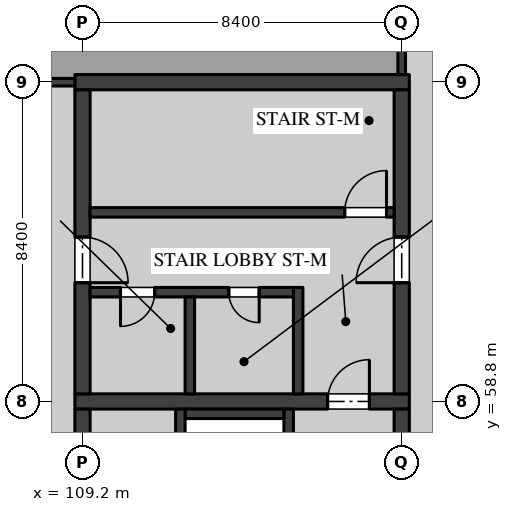
"""IFC4 building model, lengths in metres.
Left out: names, types, materials, properties, quantities, classifications, styles, units other than length and angle.
Written with IfcOpenShell. Run it as: python <this file> out.ifc"""

import sys

from ifc_helpers import new_model, si_unit, direction, frame, frame_2d, origin, place, context, subcontext, project, spatial, rectangle, extrude, element, fill, save


model = new_model("IFC4")
c1 = context("Model", 3, precision=1e-05, world=origin(), true_north=direction((0.0, 1.0)))
c2 = subcontext(c1, "Body", "Model", "MODEL_VIEW")
j1 = project(units=[si_unit("LENGTHUNIT", "METRE"), si_unit("PLANEANGLEUNIT", "RADIAN")], contexts=[c1])
p1 = place(None, origin())
s1 = spatial("IfcSite", under=j1, at=p1, CompositionType="ELEMENT")
p2 = place(p1, origin())
s2 = spatial("IfcBuilding", under=s1, at=p2, CompositionType="ELEMENT")
p3 = place(p2, frame((0.0, 0.0, -4.5)))
s3 = spatial("IfcBuildingStorey", under=s2, at=p3, CompositionType="ELEMENT", Elevation=-4.5)
p4 = place(p3, frame((109.0, 58.8, 0.0), z_axis=(0.0, 0.0, 1.0), x_axis=(1.0, 0.0, 0.0)))
e1 = element("IfcWall", 1, at=p4, inside=s3, PredefinedType="SHEAR", context=c2, shape_type="SweptSolid", body=[
    extrude(rectangle(XDim=8.8, YDim=0.4, at=frame_2d((4.4, 0.0))), origin(), (0.0, 0.0, 1.0), 4.05),
])
p5 = place(p4, frame((6.65, 0.0, 0.0)))
e2 = element("IfcOpeningElement", 2, at=p5, cuts=e1, PredefinedType="OPENING", context=c2, shape_type="SweptSolid", body=[
    extrude(rectangle(XDim=1.1, YDim=2.1, at=frame_2d((0.55, 1.05))), frame((0.0, 0.21, 0.0), z_axis=(0.0, -1.0, 0.0), x_axis=(1.0, 0.0, 0.0)), (0.0, 0.0, 1.0), 0.42),
])
p6 = place(p3, frame((109.2, 50.6, 0.0), z_axis=(0.0, 0.0, 1.0), x_axis=(0.0, 1.0, 0.0)))
e3 = element("IfcWall", 3, at=p6, inside=s3, PredefinedType="SHEAR", context=c2, shape_type="SweptSolid", body=[
    extrude(rectangle(XDim=8.0, YDim=0.4, at=frame_2d((4.0, 0.0))), origin(), (0.0, 0.0, 1.0), 4.05),
])
p7 = place(p6, frame((3.25, 0.0, 0.0)))
e4 = element("IfcOpeningElement", 4, at=p7, cuts=e3, PredefinedType="OPENING", context=c2, shape_type="SweptSolid", body=[
    extrude(rectangle(XDim=1.2, YDim=2.1, at=frame_2d((0.6, 1.05))), frame((0.0, 0.21, 0.0), z_axis=(0.0, -1.0, 0.0), x_axis=(1.0, 0.0, 0.0)), (0.0, 0.0, 1.0), 0.42),
])
p8 = place(p3, frame((117.6, 50.6, 0.0), z_axis=(0.0, 0.0, 1.0), x_axis=(0.0, 1.0, 0.0)))
e5 = element("IfcWall", 5, at=p8, inside=s3, PredefinedType="SHEAR", context=c2, shape_type="SweptSolid", body=[
    extrude(rectangle(XDim=8.0, YDim=0.4, at=frame_2d((4.0, 0.0))), origin(), (0.0, 0.0, 1.0), 4.05),
])
p9 = place(p8, frame((3.25, 0.0, 0.0)))
e6 = element("IfcOpeningElement", 6, at=p9, cuts=e5, PredefinedType="OPENING", context=c2, shape_type="SweptSolid", body=[
    extrude(rectangle(XDim=1.2, YDim=2.1, at=frame_2d((0.6, 1.05))), frame((0.0, 0.21, 0.0), z_axis=(0.0, -1.0, 0.0), x_axis=(1.0, 0.0, 0.0)), (0.0, 0.0, 1.0), 0.42),
])
p10 = place(p8, frame((6.0, 0.0, 0.0)))
e7 = element("IfcOpeningElement", 7, at=p10, cuts=e5, PredefinedType="OPENING", context=c2, shape_type="SweptSolid", body=[
    extrude(rectangle(XDim=1.2, YDim=2.1, at=frame_2d((0.6, 1.05))), frame((0.0, 0.21, 0.0), z_axis=(0.0, -1.0, 0.0), x_axis=(1.0, 0.0, 0.0)), (0.0, 0.0, 1.0), 0.42),
])
p11 = place(p3, frame((109.0, 67.2, 0.0), z_axis=(0.0, 0.0, 1.0), x_axis=(1.0, 0.0, 0.0)))
e8 = element("IfcWall", 8, at=p11, inside=s3, PredefinedType="SHEAR", context=c2, shape_type="SweptSolid", body=[
    extrude(rectangle(XDim=8.8, YDim=0.4, at=frame_2d((4.4, 0.0))), origin(), (0.0, 0.0, 1.0), 4.05),
])
p12 = place(p3, frame((109.2, 59.0, 0.0), z_axis=(0.0, 0.0, 1.0), x_axis=(0.0, 1.0, 0.0)))
e9 = element("IfcWall", 9, at=p12, inside=s3, PredefinedType="SHEAR", context=c2, shape_type="SweptSolid", body=[
    extrude(rectangle(XDim=8.0, YDim=0.4, at=frame_2d((4.0, 0.0))), origin(), (0.0, 0.0, 1.0), 4.05),
])
p13 = place(p12, frame((2.925, 0.0, 0.0)))
e10 = element("IfcOpeningElement", 10, at=p13, cuts=e9, PredefinedType="OPENING", context=c2, shape_type="SweptSolid", body=[
    extrude(rectangle(XDim=1.2, YDim=2.1, at=frame_2d((0.6, 1.05))), frame((0.0, 0.21, 0.0), z_axis=(0.0, -1.0, 0.0), x_axis=(1.0, 0.0, 0.0)), (0.0, 0.0, 1.0), 0.42),
])
p14 = place(p3, frame((117.6, 59.0, 0.0), z_axis=(0.0, 0.0, 1.0), x_axis=(0.0, 1.0, 0.0)))
e11 = element("IfcWall", 11, at=p14, inside=s3, PredefinedType="SHEAR", context=c2, shape_type="SweptSolid", body=[
    extrude(rectangle(XDim=8.0, YDim=0.4, at=frame_2d((4.0, 0.0))), origin(), (0.0, 0.0, 1.0), 4.05),
])
p15 = place(p14, frame((2.925, 0.0, 0.0)))
e12 = element("IfcOpeningElement", 12, at=p15, cuts=e11, PredefinedType="OPENING", context=c2, shape_type="SweptSolid", body=[
    extrude(rectangle(XDim=1.2, YDim=2.1, at=frame_2d((0.6, 1.05))), frame((0.0, 0.21, 0.0), z_axis=(0.0, -1.0, 0.0), x_axis=(1.0, 0.0, 0.0)), (0.0, 0.0, 1.0), 0.42),
])
p16 = place(p3, frame((117.4, 63.775, 0.0), z_axis=(0.0, 0.0, 1.0), x_axis=(-1.0, 0.0, 0.0)))
e13 = element("IfcWall", 13, at=p16, inside=s3, PredefinedType="SOLIDWALL", context=c2, shape_type="SweptSolid", body=[
    extrude(rectangle(XDim=8.0, YDim=0.25, at=frame_2d((4.0, 0.0))), origin(), (0.0, 0.0, 1.0), 4.05),
])
p17 = place(p16, frame((0.2, 0.0, 0.0)))
e14 = element("IfcOpeningElement", 14, at=p17, cuts=e13, PredefinedType="OPENING", context=c2, shape_type="SweptSolid", body=[
    extrude(rectangle(XDim=1.1, YDim=2.1, at=frame_2d((0.55, 1.05))), frame((0.0, 0.135, 0.0), z_axis=(0.0, -1.0, 0.0), x_axis=(1.0, 0.0, 0.0)), (0.0, 0.0, 1.0), 0.27),
])
p18 = place(p3, frame((114.875, 61.8, 0.0), z_axis=(0.0, 0.0, 1.0), x_axis=(0.0, -1.0, 0.0)))
e15 = element("IfcWall", 15, at=p18, inside=s3, PredefinedType="SOLIDWALL", context=c2, shape_type="SweptSolid", body=[
    extrude(rectangle(XDim=2.8, YDim=0.25, at=frame_2d((1.4, 0.0))), origin(), (0.0, 0.0, 1.0), 4.05),
])
p19 = place(p3, frame((114.75, 61.675, 0.0), z_axis=(0.0, 0.0, 1.0), x_axis=(-1.0, 0.0, 0.0)))
e16 = element("IfcWall", 16, at=p19, inside=s3, PredefinedType="SOLIDWALL", context=c2, shape_type="SweptSolid", body=[
    extrude(rectangle(XDim=5.35, YDim=0.25, at=frame_2d((2.675, 0.0))), origin(), (0.0, 0.0, 1.0), 4.05),
])
p20 = place(p19, frame((3.65, 0.0, 0.0)))
e17 = element("IfcOpeningElement", 17, at=p20, cuts=e16, PredefinedType="OPENING", context=c2, shape_type="SweptSolid", body=[
    extrude(rectangle(XDim=0.9, YDim=2.1, at=frame_2d((0.45, 1.05))), frame((0.0, 0.135, 0.0), z_axis=(0.0, -1.0, 0.0), x_axis=(1.0, 0.0, 0.0)), (0.0, 0.0, 1.0), 0.27),
])
p21 = place(p19, frame((0.9, 0.0, 0.0)))
e18 = element("IfcOpeningElement", 18, at=p21, cuts=e16, PredefinedType="OPENING", context=c2, shape_type="SweptSolid", body=[
    extrude(rectangle(XDim=0.8, YDim=2.1, at=frame_2d((0.4, 1.05))), frame((0.0, 0.135, 0.0), z_axis=(0.0, -1.0, 0.0), x_axis=(1.0, 0.0, 0.0)), (0.0, 0.0, 1.0), 0.27),
])
p22 = place(p3, frame((112.025, 61.55, 0.0), z_axis=(0.0, 0.0, 1.0), x_axis=(0.0, -1.0, 0.0)))
e19 = element("IfcWall", 19, at=p22, inside=s3, PredefinedType="SOLIDWALL", context=c2, shape_type="SweptSolid", body=[
    extrude(rectangle(XDim=2.55, YDim=0.25, at=frame_2d((1.275, 0.0))), origin(), (0.0, 0.0, 1.0), 4.05),
])
p23 = place(p3, frame((114.625, 55.5, 0.0), z_axis=(0.0, 0.0, 1.0), x_axis=(0.0, 1.0, 0.0)))
e20 = element("IfcWall", 20, at=p23, inside=s3, PredefinedType="SOLIDWALL", context=c2, shape_type="SweptSolid", body=[
    extrude(rectangle(XDim=3.1, YDim=0.25, at=frame_2d((1.55, 0.0))), origin(), (0.0, 0.0, 1.0), 4.05),
])
p24 = place(p23, frame((1.0, 0.0, 0.0)))
e21 = element("IfcOpeningElement", 21, at=p24, cuts=e20, PredefinedType="OPENING", context=c2, shape_type="SweptSolid", body=[
    extrude(rectangle(XDim=1.1, YDim=2.1, at=frame_2d((0.55, 1.05))), frame((0.0, 0.135, 0.0), z_axis=(0.0, -1.0, 0.0), x_axis=(1.0, 0.0, 0.0)), (0.0, 0.0, 1.0), 0.27),
])
p25 = place(p3, frame((111.9, 58.475, 0.0), z_axis=(0.0, 0.0, 1.0), x_axis=(1.0, 0.0, 0.0)))
e22 = element("IfcWall", 22, at=p25, inside=s3, PredefinedType="SOLIDWALL", context=c2, shape_type="SweptSolid", body=[
    extrude(rectangle(XDim=2.6, YDim=0.25, at=frame_2d((1.3, 0.0))), origin(), (0.0, 0.0, 1.0), 4.05),
])
p26 = place(p3, frame((111.775, 55.5, 0.0), z_axis=(0.0, 0.0, 1.0), x_axis=(0.0, 1.0, 0.0)))
e23 = element("IfcWall", 23, at=p26, inside=s3, PredefinedType="SOLIDWALL", context=c2, shape_type="SweptSolid", body=[
    extrude(rectangle(XDim=3.1, YDim=0.25, at=frame_2d((1.55, 0.0))), origin(), (0.0, 0.0, 1.0), 4.05),
])
p27 = place(p3, frame((101.25, 67.2, 0.0), z_axis=(0.0, 0.0, 1.0), x_axis=(1.0, 0.0, 0.0)))
e24 = element("IfcWall", 24, at=p27, inside=s3, PredefinedType="PARTITIONING", context=c2, shape_type="SweptSolid", body=[
    extrude(rectangle(XDim=7.75, YDim=0.2, at=frame_2d((3.875, 0.0))), origin(), (0.0, 0.0, 1.0), 4.05),
])
p28 = place(p3, frame((117.6, 67.4, 0.0), z_axis=(0.0, 0.0, 1.0), x_axis=(0.0, 1.0, 0.0)))
e25 = element("IfcWall", 25, at=p28, inside=s3, PredefinedType="PARTITIONING", context=c2, shape_type="SweptSolid", body=[
    extrude(rectangle(XDim=7.75, YDim=0.2, at=frame_2d((3.875, 0.0))), origin(), (0.0, 0.0, 1.0), 4.05),
])
p29 = place(p28, frame((3.1, 0.0, 0.0)))
e26 = element("IfcOpeningElement", 26, at=p29, cuts=e25, PredefinedType="OPENING", context=c2, shape_type="SweptSolid", body=[
    extrude(rectangle(XDim=1.0, YDim=2.1, at=frame_2d((0.5, 1.05))), frame((0.0, 0.11, 0.0), z_axis=(0.0, -1.0, 0.0), x_axis=(1.0, 0.0, 0.0)), (0.0, 0.0, 1.0), 0.22),
])
p30 = place(p5, origin())
e27 = element("IfcDoor", 27, at=p30, inside=s3, OperationType="SINGLE_SWING_LEFT", PredefinedType="DOOR", context=c2, shape_type="SweptSolid", body=[
    extrude(rectangle(XDim=1.1, YDim=2.1, at=frame_2d((0.55, 1.05))), frame((0.0, 0.035, 0.0), z_axis=(0.0, -1.0, 0.0), x_axis=(1.0, 0.0, 0.0)), (0.0, 0.0, 1.0), 0.07),
])
fill(e2, e27)
p31 = place(p20, origin())
e28 = element("IfcDoor", 28, at=p31, inside=s3, OperationType="SINGLE_SWING_LEFT", PredefinedType="DOOR", context=c2, shape_type="SweptSolid", body=[
    extrude(rectangle(XDim=0.9, YDim=2.1, at=frame_2d((0.45, 1.05))), frame((0.0, 0.035, 0.0), z_axis=(0.0, -1.0, 0.0), x_axis=(1.0, 0.0, 0.0)), (0.0, 0.0, 1.0), 0.07),
])
fill(e17, e28)
p32 = place(p13, frame((1.2, 0.0, 0.0), z_axis=(0.0, 0.0, 1.0), x_axis=(-1.0, 0.0, 0.0)))
e29 = element("IfcDoor", 29, at=p32, inside=s3, OperationType="SINGLE_SWING_LEFT", PredefinedType="DOOR", context=c2, shape_type="SweptSolid", body=[
    extrude(rectangle(XDim=1.2, YDim=2.1, at=frame_2d((0.6, 1.05))), frame((0.0, 0.035, 0.0), z_axis=(0.0, -1.0, 0.0), x_axis=(1.0, 0.0, 0.0)), (0.0, 0.0, 1.0), 0.07),
])
fill(e10, e29)
p33 = place(p15, origin())
e30 = element("IfcDoor", 30, at=p33, inside=s3, OperationType="SINGLE_SWING_RIGHT", PredefinedType="DOOR", context=c2, shape_type="SweptSolid", body=[
    extrude(rectangle(XDim=1.2, YDim=2.1, at=frame_2d((0.6, 1.05))), frame((0.0, 0.035, 0.0), z_axis=(0.0, -1.0, 0.0), x_axis=(1.0, 0.0, 0.0)), (0.0, 0.0, 1.0), 0.07),
])
fill(e12, e30)
p34 = place(p21, origin())
e31 = element("IfcDoor", 31, at=p34, inside=s3, OperationType="SINGLE_SWING_RIGHT", PredefinedType="DOOR", context=c2, shape_type="SweptSolid", body=[
    extrude(rectangle(XDim=0.8, YDim=2.1, at=frame_2d((0.4, 1.05))), frame((0.0, 0.035, 0.0), z_axis=(0.0, -1.0, 0.0), x_axis=(1.0, 0.0, 0.0)), (0.0, 0.0, 1.0), 0.07),
])
fill(e18, e31)
p35 = place(p17, frame((1.1, 0.0, 0.0), z_axis=(0.0, 0.0, 1.0), x_axis=(-1.0, 0.0, 0.0)))
e32 = element("IfcDoor", 32, at=p35, inside=s3, OperationType="SINGLE_SWING_LEFT", PredefinedType="DOOR", context=c2, shape_type="SweptSolid", body=[
    extrude(rectangle(XDim=1.1, YDim=2.1, at=frame_2d((0.55, 1.05))), frame((0.0, 0.035, 0.0), z_axis=(0.0, -1.0, 0.0), x_axis=(1.0, 0.0, 0.0)), (0.0, 0.0, 1.0), 0.07),
])
fill(e14, e32)
save(model, sys.argv[1])
